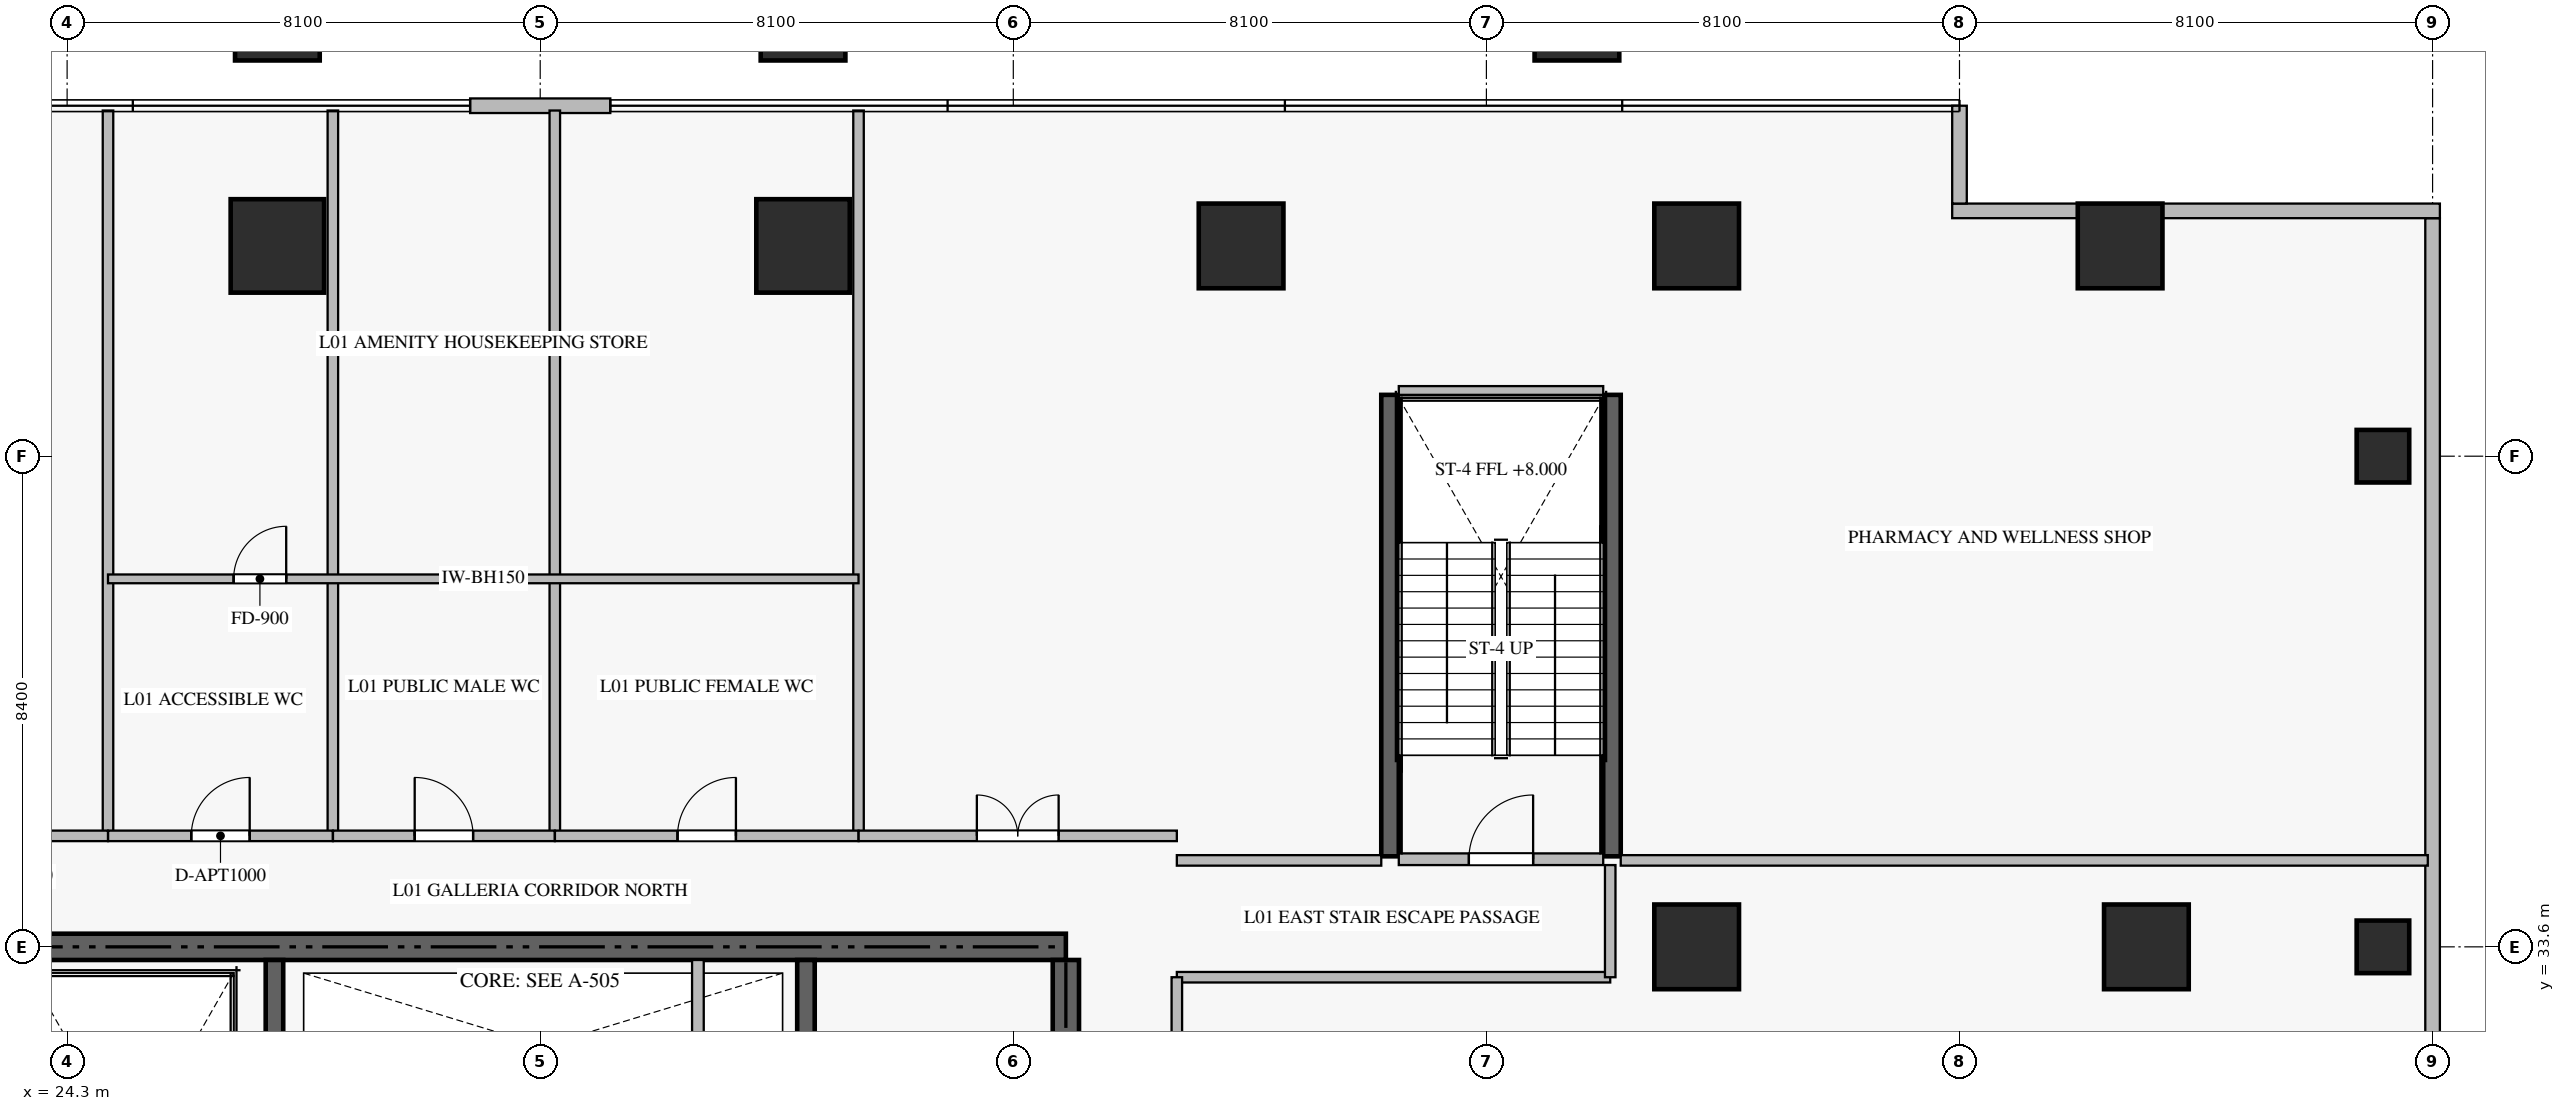
"""IFC4 building model, lengths in metres.
Left out: names, types, materials, properties, quantities, classifications, styles, units other than length and angle.
Written with IfcOpenShell. Run it as: python <this file> out.ifc"""

import sys

from ifc_helpers import new_model, si_unit, direction, frame, frame_2d, origin, origin_2d, place, context, subcontext, project, spatial, rectangle, extrude, source, transform, mapped, element, fill, save


model = new_model("IFC4")
c1 = context("Model", 3, precision=1e-05, world=origin(), true_north=direction((0.0, 1.0)))
c2 = subcontext(c1, "Body", "Model", "MODEL_VIEW")
j1 = project(units=[si_unit("LENGTHUNIT", "METRE"), si_unit("PLANEANGLEUNIT", "RADIAN")], contexts=[c1])
p1 = place(None, origin())
s1 = spatial("IfcSite", under=j1, at=p1, CompositionType="ELEMENT")
p2 = place(p1, origin())
s2 = spatial("IfcBuilding", under=s1, at=p2, CompositionType="ELEMENT")
p3 = place(p2, frame((0.0, 0.0, 5.5)))
s3 = spatial("IfcBuildingStorey", under=s2, at=p3, CompositionType="ELEMENT", Elevation=5.5)
p4 = place(p3, frame((41.4, 33.6, -0.38), z_axis=(0.0, 0.0, 1.0), x_axis=(-1.0, 0.0, 0.0)))
e1 = element("IfcWall", 1, at=p4, inside=s3, PredefinedType="SHEAR", context=c2, shape_type="SweptSolid", body=[
    extrude(rectangle(XDim=18.0, YDim=0.45, at=frame_2d((9.0, 0.0))), origin(), (0.0, 0.0, 1.0), 4.998),
])
p5 = place(p3, frame((41.4, 27.75, -0.38), z_axis=(0.0, 0.0, 1.0), x_axis=(0.0, 1.0, 0.0)))
e2 = element("IfcWall", 2, at=p5, inside=s3, PredefinedType="SHEAR", context=c2, shape_type="SweptSolid", body=[
    extrude(rectangle(XDim=5.625, YDim=0.45, at=frame_2d((2.812, 0.0))), origin(), (0.0, 0.0, 1.0), 4.998),
])
p6 = place(p3, frame((27.85, 23.55, -0.38), z_axis=(0.0, 0.0, 1.0), x_axis=(0.0, 1.0, 0.0)))
e3 = element("IfcWall", 3, at=p6, inside=s3, PredefinedType="SHEAR", context=c2, shape_type="SweptSolid", body=[
    extrude(rectangle(XDim=9.825, YDim=0.3, at=frame_2d((4.913, 0.0))), origin(), (0.0, 0.0, 1.0), 4.998),
])
p7 = place(p3, frame((36.95, 27.05, -0.38), z_axis=(0.0, 0.0, 1.0), x_axis=(0.0, 1.0, 0.0)))
e4 = element("IfcWall", 4, at=p7, inside=s3, PredefinedType="SHEAR", context=c2, shape_type="SweptSolid", body=[
    extrude(rectangle(XDim=6.325, YDim=0.3, at=frame_2d((3.163, 0.0))), origin(), (0.0, 0.0, 1.0), 4.998),
])
m1 = source(origin(), c2, "Body", "SweptSolid", [
    extrude(rectangle(XDim=0.9, YDim=0.9, at=origin_2d()), origin(), (0.0, 0.0, 1.0), 5.0),
])
for number, where, z_axis, x_axis in (
    (5, (63.95, 33.6, -0.38), (0.0, 0.0, 1.0), (1.0, 0.0, 0.0)),
    (6, (63.95, 42.0, -0.38), (0.0, 0.0, 1.0), (1.0, 0.0, 0.0)),
):
    element("IfcColumn", number, at=place(p3, frame(where, z_axis=z_axis, x_axis=x_axis)), inside=s3, PredefinedType="COLUMN", context=c2, shape_type="MappedRepresentation", body=[
        mapped(m1, transform((0.0, 0.0, 0.0), scale=1.0)),
    ])
m2 = source(origin(), c2, "Body", "SweptSolid", [
    extrude(rectangle(XDim=1.6, YDim=1.6, at=origin_2d()), origin(), (0.0, 0.0, 1.0), 5.0),
])
for number, where, z_axis, x_axis in (
    (7, (27.9, 45.6, -0.38), (0.0, 0.0, 1.0), (1.0, 0.0, 0.0)),
    (8, (36.9, 45.6, -0.38), (0.0, 0.0, 1.0), (1.0, 0.0, 0.0)),
):
    element("IfcColumn", number, at=place(p3, frame(where, z_axis=z_axis, x_axis=x_axis)), inside=s3, PredefinedType="COLUMN", context=c2, shape_type="MappedRepresentation", body=[
        mapped(m2, transform((0.0, 0.0, 0.0), scale=1.0)),
    ])
m3 = source(origin(), c2, "Body", "SweptSolid", [
    extrude(rectangle(XDim=1.45, YDim=1.45, at=origin_2d()), origin(), (0.0, 0.0, 1.0), 5.0),
])
for number, where, z_axis, x_axis in (
    (9, (44.4, 45.6, -0.38), (0.0, 0.0, 1.0), (1.0, 0.0, 0.0)),
    (10, (52.2, 45.6, -0.38), (0.0, 0.0, 1.0), (1.0, 0.0, 0.0)),
    (11, (52.2, 33.6, -0.38), (0.0, 0.0, 1.0), (1.0, 0.0, 0.0)),
    (12, (27.9, 49.5, -0.38), (0.0, 0.0, 1.0), (1.0, 0.0, 0.0)),
    (13, (36.9, 49.5, -0.38), (0.0, 0.0, 1.0), (1.0, 0.0, 0.0)),
    (14, (50.15, 49.5, -0.38), (0.0, 0.0, 1.0), (1.0, 0.0, 0.0)),
    (15, (59.9, 33.6, -0.38), (0.0, 0.0, 1.0), (1.0, 0.0, 0.0)),
    (16, (59.45, 45.6, -0.38), (0.0, 0.0, 1.0), (1.0, 0.0, 0.0)),
):
    element("IfcColumn", number, at=place(p3, frame(where, z_axis=z_axis, x_axis=x_axis)), inside=s3, PredefinedType="COLUMN", context=c2, shape_type="MappedRepresentation", body=[
        mapped(m3, transform((0.0, 0.0, 0.0), scale=1.0)),
    ])
p8 = place(p3, frame((64.8, 4.325, 0.0), z_axis=(0.0, 0.0, 1.0), x_axis=(0.0, 1.0, 0.0)))
e17 = element("IfcWall", 17, at=p8, inside=s3, PredefinedType="ELEMENTEDWALL", context=c2, shape_type="SweptSolid", body=[
    extrude(rectangle(XDim=41.75, YDim=0.25, at=frame_2d((20.875, 0.0))), origin(), (0.0, 0.0, 1.0), 4.605),
])
p9 = place(p8, frame((14.801, 0.0, 0.6)))
e18 = element("IfcOpeningElement", 18, at=p9, cuts=e17, PredefinedType="OPENING", context=c2, shape_type="SweptSolid", body=[
    extrude(rectangle(XDim=2.8, YDim=3.0, at=frame_2d((1.4, 1.5))), frame((0.0, 0.135, 0.0), z_axis=(0.0, -1.0, 0.0), x_axis=(1.0, 0.0, 0.0)), (0.0, 0.0, 1.0), 0.27),
])
p10 = place(p8, frame((24.149, 0.0, 0.6)))
e19 = element("IfcOpeningElement", 19, at=p10, cuts=e17, PredefinedType="OPENING", context=c2, shape_type="SweptSolid", body=[
    extrude(rectangle(XDim=2.8, YDim=3.0, at=frame_2d((1.4, 1.5))), frame((0.0, 0.135, 0.0), z_axis=(0.0, -1.0, 0.0), x_axis=(1.0, 0.0, 0.0)), (0.0, 0.0, 1.0), 0.27),
])
p11 = place(p3, frame((64.925, 46.2, 0.0), z_axis=(0.0, 0.0, 1.0), x_axis=(-1.0, 0.0, 0.0)))
e20 = element("IfcWall", 20, at=p11, inside=s3, PredefinedType="ELEMENTEDWALL", context=c2, shape_type="SweptSolid", body=[
    extrude(rectangle(XDim=8.35, YDim=0.25, at=frame_2d((4.175, 0.0))), origin(), (0.0, 0.0, 1.0), 4.605),
])
p12 = place(p3, frame((56.7, 46.325, 0.0), z_axis=(0.0, 0.0, 1.0), x_axis=(0.0, 1.0, 0.0)))
e21 = element("IfcWall", 21, at=p12, inside=s3, PredefinedType="ELEMENTEDWALL", context=c2, shape_type="SweptSolid", body=[
    extrude(rectangle(XDim=1.675, YDim=0.25, at=frame_2d((0.837, 0.0))), origin(), (0.0, 0.0, 1.0), 4.605),
])
p13 = place(p3, frame((33.6, 48.0, 0.0), z_axis=(0.0, 0.0, 1.0), x_axis=(-1.0, 0.0, 0.0)))
e22 = element("IfcWall", 22, at=p13, inside=s3, PredefinedType="ELEMENTEDWALL", context=c2, shape_type="SweptSolid", body=[
    extrude(rectangle(XDim=2.4, YDim=0.25, at=frame_2d((1.2, 0.0))), origin(), (0.0, 0.0, 1.0), 4.605),
])
for number, where, z_axis, x_axis in (
    (23, (46.95, 35.15, -0.38), (0.0, 0.0, 1.0), (0.0, 1.0, 0.0)),
    (24, (50.75, 35.15, -0.38), (0.0, 0.0, 1.0), (0.0, 1.0, 0.0)),
):
    element("IfcWall", number, at=place(p3, frame(where, z_axis=z_axis, x_axis=x_axis)), inside=s3, PredefinedType="SHEAR", context=c2, shape_type="SweptSolid", body=[
        extrude(rectangle(XDim=7.9, YDim=0.3, at=frame_2d((3.95, 0.0))), origin(), (0.0, 0.0, 1.0), 4.998),
    ])
p14 = place(p3, frame((47.1, 35.1, 0.0), z_axis=(0.0, 0.0, 1.0), x_axis=(1.0, 0.0, 0.0)))
e25 = element("IfcWall", 25, at=p14, inside=s3, PredefinedType="STANDARD", context=c2, shape_type="SweptSolid", body=[
    extrude(rectangle(XDim=3.5, YDim=0.2, at=frame_2d((1.75, 0.0))), origin(), (0.0, 0.0, 1.0), 4.62),
])
p15 = place(p14, frame((1.2, 0.0, 0.0)))
e26 = element("IfcOpeningElement", 26, at=p15, cuts=e25, PredefinedType="OPENING", context=c2, shape_type="SweptSolid", body=[
    extrude(rectangle(XDim=1.1, YDim=2.15, at=frame_2d((0.55, 1.075))), frame((0.0, 0.11, 0.0), z_axis=(0.0, -1.0, 0.0), x_axis=(1.0, 0.0, 0.0)), (0.0, 0.0, 1.0), 0.22),
])
p16 = place(p3, frame((47.1, 43.1, 0.0), z_axis=(0.0, 0.0, 1.0), x_axis=(1.0, 0.0, 0.0)))
e27 = element("IfcWall", 27, at=p16, inside=s3, PredefinedType="STANDARD", context=c2, shape_type="SweptSolid", body=[
    extrude(rectangle(XDim=3.5, YDim=0.2, at=frame_2d((1.75, 0.0))), origin(), (0.0, 0.0, 1.0), 1.985),
])
p17 = place(p3, frame((35.1, 30.75, 0.0), z_axis=(0.0, 0.0, 1.0), x_axis=(0.0, 1.0, 0.0)))
e28 = element("IfcWall", 28, at=p17, inside=s3, PredefinedType="STANDARD", context=c2, shape_type="SweptSolid", body=[
    extrude(rectangle(XDim=2.625, YDim=0.2, at=frame_2d((1.312, 0.0))), origin(), (0.0, 0.0, 1.0), 4.62),
])
p18 = place(p3, frame((43.3, 35.08, 0.0), z_axis=(0.0, 0.0, 1.0), x_axis=(1.0, 0.0, 0.0)))
e29 = element("IfcWall", 29, at=p18, inside=s3, PredefinedType="PARTITIONING", context=c2, shape_type="SweptSolid", body=[
    extrude(rectangle(XDim=3.5, YDim=0.18, at=frame_2d((1.75, 0.0))), origin(), (0.0, 0.0, 1.0), 4.62),
])
p19 = place(p3, frame((43.3, 33.08, 0.0), z_axis=(0.0, 0.0, 1.0), x_axis=(1.0, 0.0, 0.0)))
e30 = element("IfcWall", 30, at=p19, inside=s3, PredefinedType="PARTITIONING", context=c2, shape_type="SweptSolid", body=[
    extrude(rectangle(XDim=7.42, YDim=0.18, at=frame_2d((3.71, 0.0))), origin(), (0.0, 0.0, 1.0), 4.62),
])
p20 = place(p3, frame((50.9, 35.08, 0.0), z_axis=(0.0, 0.0, 1.0), x_axis=(1.0, 0.0, 0.0)))
e31 = element("IfcWall", 31, at=p20, inside=s3, PredefinedType="PARTITIONING", context=c2, shape_type="SweptSolid", body=[
    extrude(rectangle(XDim=13.818, YDim=0.18, at=frame_2d((6.909, 0.0))), origin(), (0.0, 0.0, 1.0), 4.62),
])
p21 = place(p3, frame((50.72, 33.08, 0.0), z_axis=(0.0, 0.0, 1.0), x_axis=(0.0, 1.0, 0.0)))
e32 = element("IfcWall", 32, at=p21, inside=s3, PredefinedType="PARTITIONING", context=c2, shape_type="SweptSolid", body=[
    extrude(rectangle(XDim=1.92, YDim=0.18, at=frame_2d((0.96, 0.0))), origin(), (0.0, 0.0, 1.0), 4.62),
])
p22 = place(p3, frame((43.3, 14.9, 0.0), z_axis=(0.0, 0.0, 1.0), x_axis=(0.0, 1.0, 0.0)))
e33 = element("IfcWall", 33, at=p22, inside=s3, PredefinedType="PARTITIONING", context=c2, shape_type="SweptSolid", body=[
    extrude(rectangle(XDim=18.18, YDim=0.18, at=frame_2d((9.09, 0.0))), origin(), (0.0, 0.0, 1.0), 4.62),
])
p23 = place(p22, frame((8.34, 0.0, 0.0)))
e34 = element("IfcOpeningElement", 34, at=p23, cuts=e33, PredefinedType="OPENING", context=c2, shape_type="SweptSolid", body=[
    extrude(rectangle(XDim=1.5, YDim=2.25, at=frame_2d((0.75, 1.125))), frame((0.0, 0.1, 0.0), z_axis=(0.0, -1.0, 0.0), x_axis=(1.0, 0.0, 0.0)), (0.0, 0.0, 1.0), 0.2),
])
for number, where, z_axis, x_axis in (
    (35, (25.0, 35.5, 0.0), (0.0, 0.0, 1.0), (0.0, 1.0, 0.0)),
    (36, (28.85, 35.5, 0.0), (0.0, 0.0, 1.0), (0.0, 1.0, 0.0)),
    (37, (32.65, 35.5, 0.0), (0.0, 0.0, 1.0), (0.0, 1.0, 0.0)),
    (38, (37.85, 35.5, 0.0), (0.0, 0.0, 1.0), (0.0, 1.0, 0.0)),
):
    element("IfcWall", number, at=place(p3, frame(where, z_axis=z_axis, x_axis=x_axis)), inside=s3, PredefinedType="PARTITIONING", context=c2, shape_type="SweptSolid", body=[
        extrude(rectangle(XDim=12.418, YDim=0.18, at=frame_2d((6.209, 0.0))), origin(), (0.0, 0.0, 1.0), 4.62),
    ])
p24 = place(p3, frame((21.5, 35.5, 0.0), z_axis=(0.0, 0.0, 1.0), x_axis=(1.0, 0.0, 0.0)))
e39 = element("IfcWall", 39, at=p24, inside=s3, PredefinedType="PARTITIONING", context=c2, shape_type="SweptSolid", body=[
    extrude(rectangle(XDim=3.5, YDim=0.18, at=frame_2d((1.75, 0.0))), origin(), (0.0, 0.0, 1.0), 4.62),
])
p25 = place(p24, frame((1.05, 0.0, 0.0)))
e40 = element("IfcOpeningElement", 40, at=p25, cuts=e39, PredefinedType="OPENING", context=c2, shape_type="SweptSolid", body=[
    extrude(rectangle(XDim=1.4, YDim=2.25, at=frame_2d((0.7, 1.125))), frame((0.0, 0.1, 0.0), z_axis=(0.0, -1.0, 0.0), x_axis=(1.0, 0.0, 0.0)), (0.0, 0.0, 1.0), 0.2),
])
p26 = place(p3, frame((25.002, 35.5, 0.0), z_axis=(0.0, 0.0, 1.0), x_axis=(1.0, 0.0, 0.0)))
e41 = element("IfcWall", 41, at=p26, inside=s3, PredefinedType="PARTITIONING", context=c2, shape_type="SweptSolid", body=[
    extrude(rectangle(XDim=3.848, YDim=0.18, at=frame_2d((1.924, 0.0))), origin(), (0.0, 0.0, 1.0), 4.62),
])
p27 = place(p26, frame((1.424, 0.0, 0.0)))
e42 = element("IfcOpeningElement", 42, at=p27, cuts=e41, PredefinedType="OPENING", context=c2, shape_type="SweptSolid", body=[
    extrude(rectangle(XDim=1.0, YDim=2.15, at=frame_2d((0.5, 1.075))), frame((0.0, 0.1, 0.0), z_axis=(0.0, -1.0, 0.0), x_axis=(1.0, 0.0, 0.0)), (0.0, 0.0, 1.0), 0.2),
])
p28 = place(p3, frame((28.852, 35.5, 0.0), z_axis=(0.0, 0.0, 1.0), x_axis=(1.0, 0.0, 0.0)))
e43 = element("IfcWall", 43, at=p28, inside=s3, PredefinedType="PARTITIONING", context=c2, shape_type="SweptSolid", body=[
    extrude(rectangle(XDim=3.798, YDim=0.18, at=frame_2d((1.899, 0.0))), origin(), (0.0, 0.0, 1.0), 4.62),
])
p29 = place(p28, frame((1.399, 0.0, 0.0)))
e44 = element("IfcOpeningElement", 44, at=p29, cuts=e43, PredefinedType="OPENING", context=c2, shape_type="SweptSolid", body=[
    extrude(rectangle(XDim=1.0, YDim=2.15, at=frame_2d((0.5, 1.075))), frame((0.0, 0.1, 0.0), z_axis=(0.0, -1.0, 0.0), x_axis=(1.0, 0.0, 0.0)), (0.0, 0.0, 1.0), 0.2),
])
p30 = place(p3, frame((32.652, 35.5, 0.0), z_axis=(0.0, 0.0, 1.0), x_axis=(1.0, 0.0, 0.0)))
e45 = element("IfcWall", 45, at=p30, inside=s3, PredefinedType="PARTITIONING", context=c2, shape_type="SweptSolid", body=[
    extrude(rectangle(XDim=5.198, YDim=0.18, at=frame_2d((2.599, 0.0))), origin(), (0.0, 0.0, 1.0), 4.62),
])
p31 = place(p30, frame((2.099, 0.0, 0.0)))
e46 = element("IfcOpeningElement", 46, at=p31, cuts=e45, PredefinedType="OPENING", context=c2, shape_type="SweptSolid", body=[
    extrude(rectangle(XDim=1.0, YDim=2.15, at=frame_2d((0.5, 1.075))), frame((0.0, 0.1, 0.0), z_axis=(0.0, -1.0, 0.0), x_axis=(1.0, 0.0, 0.0)), (0.0, 0.0, 1.0), 0.2),
])
p32 = place(p3, frame((37.852, 35.5, 0.0), z_axis=(0.0, 0.0, 1.0), x_axis=(1.0, 0.0, 0.0)))
e47 = element("IfcWall", 47, at=p32, inside=s3, PredefinedType="PARTITIONING", context=c2, shape_type="SweptSolid", body=[
    extrude(rectangle(XDim=5.448, YDim=0.18, at=frame_2d((2.724, 0.0))), origin(), (0.0, 0.0, 1.0), 4.62),
])
p33 = place(p32, frame((2.024, 0.0, 0.0)))
e48 = element("IfcOpeningElement", 48, at=p33, cuts=e47, PredefinedType="OPENING", context=c2, shape_type="SweptSolid", body=[
    extrude(rectangle(XDim=1.4, YDim=2.25, at=frame_2d((0.7, 1.125))), frame((0.0, 0.1, 0.0), z_axis=(0.0, -1.0, 0.0), x_axis=(1.0, 0.0, 0.0)), (0.0, 0.0, 1.0), 0.2),
])
p34 = place(p3, frame((25.0, 39.9, 0.0), z_axis=(0.0, 0.0, 1.0), x_axis=(1.0, 0.0, 0.0)))
e49 = element("IfcWall", 49, at=p34, inside=s3, PredefinedType="PARTITIONING", context=c2, shape_type="SweptSolid", body=[
    extrude(rectangle(XDim=12.85, YDim=0.15, at=frame_2d((6.425, 0.0))), origin(), (0.0, 0.0, 1.0), 4.62),
])
p35 = place(p34, frame((2.151, 0.0, 0.0)))
e50 = element("IfcOpeningElement", 50, at=p35, cuts=e49, PredefinedType="OPENING", context=c2, shape_type="SweptSolid", body=[
    extrude(rectangle(XDim=0.9, YDim=2.1, at=frame_2d((0.45, 1.05))), frame((0.0, 0.085, 0.0), z_axis=(0.0, -1.0, 0.0), x_axis=(1.0, 0.0, 0.0)), (0.0, 0.0, 1.0), 0.17),
])
m4 = source(origin(), c2, "Body", "SweptSolid", [
    extrude(rectangle(XDim=1.1, YDim=2.15, at=frame_2d((0.55, 1.075))), frame((0.0, 0.025, 0.0), z_axis=(0.0, -1.0, 0.0), x_axis=(1.0, 0.0, 0.0)), (0.0, 0.0, 1.0), 0.05),
])
p36 = place(p15, origin())
e51 = element("IfcDoor", 51, at=p36, inside=s3, OperationType="SINGLE_SWING_RIGHT", PredefinedType="DOOR", context=c2, shape_type="MappedRepresentation", body=[
    mapped(m4, transform((0.0, 0.0, 0.0), scale=1.0)),
])
fill(e26, e51)
m5 = source(origin(), c2, "Body", "SweptSolid", [
    extrude(rectangle(XDim=1.0, YDim=2.15, at=frame_2d((0.5, 1.075))), frame((0.0, 0.025, 0.0), z_axis=(0.0, -1.0, 0.0), x_axis=(1.0, 0.0, 0.0)), (0.0, 0.0, 1.0), 0.05),
])
p37 = place(p27, origin())
e52 = element("IfcDoor", 52, at=p37, inside=s3, OperationType="SINGLE_SWING_RIGHT", PredefinedType="DOOR", context=c2, shape_type="MappedRepresentation", body=[
    mapped(m5, transform((0.0, 0.0, 0.0), scale=1.0)),
])
fill(e42, e52)
p38 = place(p29, origin())
e53 = element("IfcDoor", 53, at=p38, inside=s3, OperationType="SINGLE_SWING_LEFT", PredefinedType="DOOR", context=c2, shape_type="MappedRepresentation", body=[
    mapped(m5, transform((0.0, 0.0, 0.0), scale=1.0)),
])
fill(e44, e53)
p39 = place(p31, origin())
e54 = element("IfcDoor", 54, at=p39, inside=s3, OperationType="SINGLE_SWING_RIGHT", PredefinedType="DOOR", context=c2, shape_type="MappedRepresentation", body=[
    mapped(m5, transform((0.0, 0.0, 0.0), scale=1.0)),
])
fill(e46, e54)
m6 = source(origin(), c2, "Body", "SweptSolid", [
    extrude(rectangle(XDim=1.4, YDim=2.25, at=frame_2d((0.7, 1.125))), frame((0.0, 0.025, 0.0), z_axis=(0.0, -1.0, 0.0), x_axis=(1.0, 0.0, 0.0)), (0.0, 0.0, 1.0), 0.05),
])
p40 = place(p33, origin())
e55 = element("IfcDoor", 55, at=p40, inside=s3, OperationType="DOUBLE_DOOR_SINGLE_SWING", PredefinedType="DOOR", context=c2, shape_type="MappedRepresentation", body=[
    mapped(m6, transform((0.0, 0.0, 0.0), scale=1.0)),
])
fill(e48, e55)
m7 = source(origin(), c2, "Body", "SweptSolid", [
    extrude(rectangle(XDim=0.9, YDim=2.1, at=frame_2d((0.45, 1.05))), frame((0.0, 0.025, 0.0), z_axis=(0.0, -1.0, 0.0), x_axis=(1.0, 0.0, 0.0)), (0.0, 0.0, 1.0), 0.05),
])
p41 = place(p35, origin())
e56 = element("IfcDoor", 56, at=p41, inside=s3, OperationType="SINGLE_SWING_RIGHT", PredefinedType="DOOR", context=c2, shape_type="MappedRepresentation", body=[
    mapped(m7, transform((0.0, 0.0, 0.0), scale=1.0)),
])
fill(e50, e56)
save(model, sys.argv[1])
